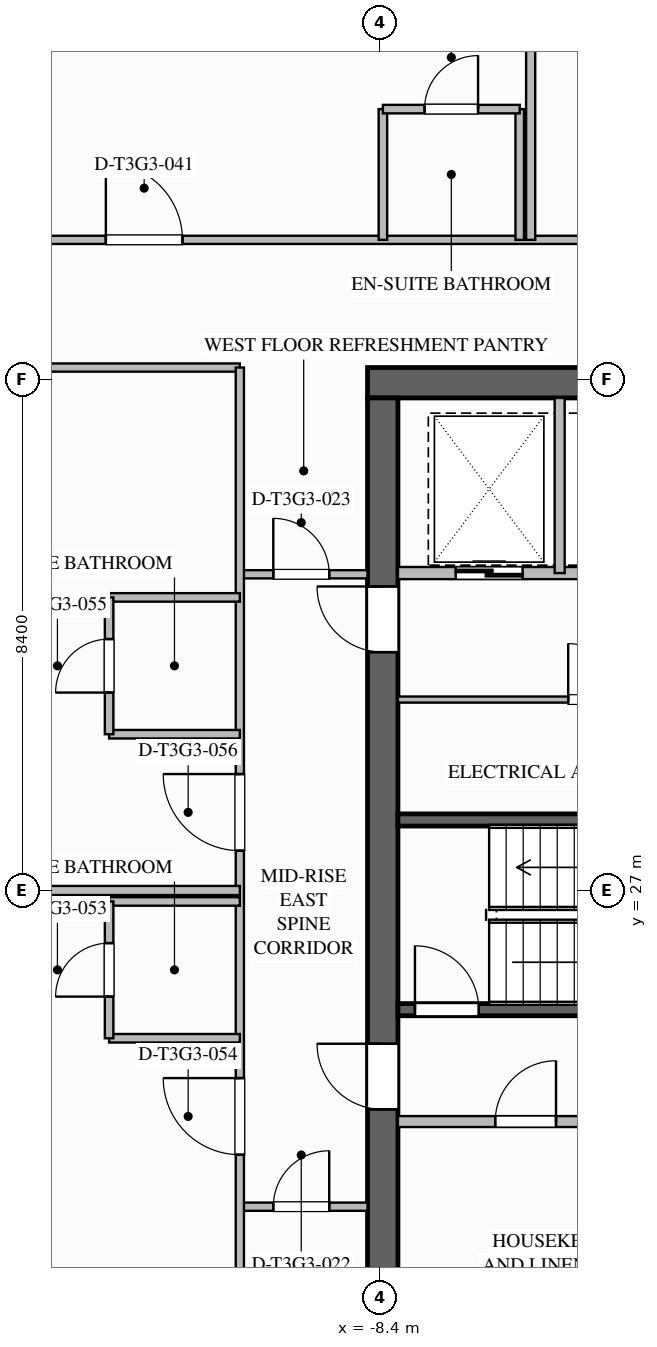
"""IFC4 building model, lengths in metres.
Left out: names, types, materials, properties, quantities, classifications, styles, units other than length and angle.
Written with IfcOpenShell. Run it as: python <this file> out.ifc"""

import sys

from ifc_helpers import new_model, si_unit, direction, frame, frame_2d, origin, place, context, subcontext, project, spatial, rectangle, extrude, element, fill, save


model = new_model("IFC4")
c1 = context("Model", 3, precision=1e-05, world=origin(), true_north=direction((0.0, 1.0)))
c2 = subcontext(c1, "Body", "Model", "MODEL_VIEW")
j1 = project(units=[si_unit("LENGTHUNIT", "METRE"), si_unit("PLANEANGLEUNIT", "RADIAN")], contexts=[c1])
p1 = place(None, origin())
s1 = spatial("IfcSite", under=j1, at=p1, CompositionType="ELEMENT")
p2 = place(p1, origin())
s2 = spatial("IfcBuilding", under=s1, at=p2, CompositionType="ELEMENT")
p3 = place(p2, frame((0.0, 0.0, 178.8)))
s3 = spatial("IfcBuildingStorey", under=s2, at=p3, CompositionType="ELEMENT", Elevation=178.8)
p4 = place(p3, frame((-8.6, 35.35, 0.0), z_axis=(0.0, 0.0, 1.0), x_axis=(1.0, 0.0, 0.0)))
e1 = element("IfcWall", 1, at=p4, inside=s3, PredefinedType="SHEAR", context=c2, shape_type="SweptSolid", body=[
    extrude(rectangle(XDim=17.2, YDim=0.5, at=frame_2d((8.6, 0.0))), origin(), (0.0, 0.0, 1.0), 3.55),
])
p5 = place(p3, frame((-8.35, 18.9, 0.0), z_axis=(0.0, 0.0, 1.0), x_axis=(0.0, 1.0, 0.0)))
e2 = element("IfcWall", 2, at=p5, inside=s3, PredefinedType="SHEAR", context=c2, shape_type="SweptSolid", body=[
    extrude(rectangle(XDim=16.2, YDim=0.5, at=frame_2d((8.1, 0.0))), origin(), (0.0, 0.0, 1.0), 3.55),
])
p6 = place(p5, frame((12.02, 0.0, 0.0)))
e3 = element("IfcOpeningElement", 3, at=p6, cuts=e2, PredefinedType="OPENING", context=c2, shape_type="SweptSolid", body=[
    extrude(rectangle(XDim=1.08, YDim=2.04, at=frame_2d((0.54, 1.02))), frame((0.0, 0.26, 0.0), z_axis=(0.0, -1.0, 0.0), x_axis=(1.0, 0.0, 0.0)), (0.0, 0.0, 1.0), 0.52),
])
p7 = place(p5, frame((4.5, 0.0, 0.0)))
e4 = element("IfcOpeningElement", 4, at=p7, cuts=e2, PredefinedType="OPENING", context=c2, shape_type="SweptSolid", body=[
    extrude(rectangle(XDim=1.08, YDim=2.04, at=frame_2d((0.54, 1.02))), frame((0.0, 0.26, 0.0), z_axis=(0.0, -1.0, 0.0), x_axis=(1.0, 0.0, 0.0)), (0.0, 0.0, 1.0), 0.52),
])
p8 = place(p3, frame((-8.1, 25.04, 0.0), z_axis=(0.0, 0.0, 1.0), x_axis=(1.0, 0.0, 0.0)))
e5 = element("IfcWall", 5, at=p8, inside=s3, PredefinedType="SOLIDWALL", context=c2, shape_type="SweptSolid", body=[
    extrude(rectangle(XDim=8.1, YDim=0.2, at=frame_2d((4.05, 0.0))), origin(), (0.0, 0.0, 1.0), 3.29),
])
p9 = place(p8, frame((0.28, 0.0, 0.0)))
e6 = element("IfcOpeningElement", 6, at=p9, cuts=e5, PredefinedType="OPENING", context=c2, shape_type="SweptSolid", body=[
    extrude(rectangle(XDim=1.05, YDim=2.1, at=frame_2d((0.525, 1.05))), frame((0.0, 0.11, 0.0), z_axis=(0.0, -1.0, 0.0), x_axis=(1.0, 0.0, 0.0)), (0.0, 0.0, 1.0), 0.22),
])
p10 = place(p3, frame((-8.1, 28.16, 0.0), z_axis=(0.0, 0.0, 1.0), x_axis=(1.0, 0.0, 0.0)))
e7 = element("IfcWall", 7, at=p10, inside=s3, PredefinedType="SOLIDWALL", context=c2, shape_type="SweptSolid", body=[
    extrude(rectangle(XDim=8.1, YDim=0.2, at=frame_2d((4.05, 0.0))), origin(), (0.0, 0.0, 1.0), 3.29),
])
p11 = place(p3, frame((-8.1, 32.22, 0.0), z_axis=(0.0, 0.0, 1.0), x_axis=(1.0, 0.0, 0.0)))
e8 = element("IfcWall", 8, at=p11, inside=s3, PredefinedType="SOLIDWALL", context=c2, shape_type="SweptSolid", body=[
    extrude(rectangle(XDim=7.1, YDim=0.2, at=frame_2d((3.55, 0.0))), origin(), (0.0, 0.0, 1.0), 3.29),
])
p12 = place(p11, frame((0.95, 0.0, 0.0)))
e9 = element("IfcOpeningElement", 9, at=p12, cuts=e8, PredefinedType="OPENING", context=c2, shape_type="SweptSolid", body=[
    extrude(rectangle(XDim=1.1, YDim=2.2, at=frame_2d((0.55, 1.1))), frame((0.0, 0.11, 0.0), z_axis=(0.0, -1.0, 0.0), x_axis=(1.0, 0.0, 0.0)), (0.0, 0.0, 1.0), 0.22),
])
p13 = place(p11, frame((3.27, 0.0, 0.0)))
e10 = element("IfcOpeningElement", 10, at=p13, cuts=e8, PredefinedType="OPENING", context=c2, shape_type="SweptSolid", body=[
    extrude(rectangle(XDim=1.1, YDim=2.2, at=frame_2d((0.55, 1.1))), frame((0.0, 0.11, 0.0), z_axis=(0.0, -1.0, 0.0), x_axis=(1.0, 0.0, 0.0)), (0.0, 0.0, 1.0), 0.22),
])
p14 = place(p11, frame((5.59, 0.0, 0.0)))
e11 = element("IfcOpeningElement", 11, at=p14, cuts=e8, PredefinedType="OPENING", context=c2, shape_type="SweptSolid", body=[
    extrude(rectangle(XDim=1.1, YDim=2.2, at=frame_2d((0.55, 1.1))), frame((0.0, 0.11, 0.0), z_axis=(0.0, -1.0, 0.0), x_axis=(1.0, 0.0, 0.0)), (0.0, 0.0, 1.0), 0.22),
])
p15 = place(p3, frame((-5.44, 32.22, 0.0), z_axis=(0.0, 0.0, 1.0), x_axis=(0.0, 1.0, 0.0)))
e12 = element("IfcWall", 12, at=p15, inside=s3, PredefinedType="PARTITIONING", context=c2, shape_type="SweptSolid", body=[
    extrude(rectangle(XDim=2.88, YDim=0.165, at=frame_2d((1.44, 0.0))), origin(), (0.0, 0.0, 1.0), 3.29),
])
p16 = place(p3, frame((-8.1, 30.14, 0.0), z_axis=(0.0, 0.0, 1.0), x_axis=(1.0, 0.0, 0.0)))
e13 = element("IfcWall", 13, at=p16, inside=s3, PredefinedType="PARTITIONING", context=c2, shape_type="SweptSolid", body=[
    extrude(rectangle(XDim=7.1, YDim=0.1, at=frame_2d((3.55, 0.0))), origin(), (0.0, 0.0, 1.0), 3.29),
])
p17 = place(p16, frame((2.8, 0.0, 0.0)))
e14 = element("IfcOpeningElement", 14, at=p17, cuts=e13, PredefinedType="OPENING", context=c2, shape_type="SweptSolid", body=[
    extrude(rectangle(XDim=0.92, YDim=2.1, at=frame_2d((0.46, 1.05))), frame((0.0, 0.06, 0.0), z_axis=(0.0, -1.0, 0.0), x_axis=(1.0, 0.0, 0.0)), (0.0, 0.0, 1.0), 0.12),
])
p18 = place(p3, frame((-8.1, 23.2, 0.0), z_axis=(0.0, 0.0, 1.0), x_axis=(1.0, 0.0, 0.0)))
e15 = element("IfcWall", 15, at=p18, inside=s3, PredefinedType="SOLIDWALL", context=c2, shape_type="SweptSolid", body=[
    extrude(rectangle(XDim=8.65, YDim=0.18, at=frame_2d((4.325, 0.0))), origin(), (0.0, 0.0, 1.0), 3.29),
])
p19 = place(p18, frame((1.6, 0.0, 0.0)))
e16 = element("IfcOpeningElement", 16, at=p19, cuts=e15, PredefinedType="OPENING", context=c2, shape_type="SweptSolid", body=[
    extrude(rectangle(XDim=1.0, YDim=2.1, at=frame_2d((0.5, 1.05))), frame((0.0, 0.1, 0.0), z_axis=(0.0, -1.0, 0.0), x_axis=(1.0, 0.0, 0.0)), (0.0, 0.0, 1.0), 0.2),
])
p20 = place(p18, frame((6.2, 0.0, 0.0)))
e17 = element("IfcOpeningElement", 17, at=p20, cuts=e15, PredefinedType="OPENING", context=c2, shape_type="SweptSolid", body=[
    extrude(rectangle(XDim=1.0, YDim=2.1, at=frame_2d((0.5, 1.05))), frame((0.0, 0.1, 0.0), z_axis=(0.0, -1.0, 0.0), x_axis=(1.0, 0.0, 0.0)), (0.0, 0.0, 1.0), 0.2),
])
p21 = place(p3, frame((-10.7, 21.8, 0.0), z_axis=(0.0, 0.0, 1.0), x_axis=(1.0, 0.0, 0.0)))
e18 = element("IfcWall", 18, at=p21, inside=s3, PredefinedType="PARTITIONING", context=c2, shape_type="SweptSolid", body=[
    extrude(rectangle(XDim=2.1, YDim=0.135, at=frame_2d((1.05, 0.0))), origin(), (0.0, 0.0, 1.0), 3.29),
])
p22 = place(p21, frame((0.55, 0.0, 0.0)))
e19 = element("IfcOpeningElement", 19, at=p22, cuts=e18, PredefinedType="OPENING", context=c2, shape_type="SweptSolid", body=[
    extrude(rectangle(XDim=0.92, YDim=2.1, at=frame_2d((0.46, 1.05))), frame((0.0, 0.077, 0.0), z_axis=(0.0, -1.0, 0.0), x_axis=(1.0, 0.0, 0.0)), (0.0, 0.0, 1.0), 0.155),
])
p23 = place(p3, frame((-10.7, 32.2, 0.0), z_axis=(0.0, 0.0, 1.0), x_axis=(1.0, 0.0, 0.0)))
e20 = element("IfcWall", 20, at=p23, inside=s3, PredefinedType="PARTITIONING", context=c2, shape_type="SweptSolid", body=[
    extrude(rectangle(XDim=2.1, YDim=0.135, at=frame_2d((1.05, 0.0))), origin(), (0.0, 0.0, 1.0), 3.29),
])
p24 = place(p23, frame((0.55, 0.0, 0.0)))
e21 = element("IfcOpeningElement", 21, at=p24, cuts=e20, PredefinedType="OPENING", context=c2, shape_type="SweptSolid", body=[
    extrude(rectangle(XDim=0.92, YDim=2.1, at=frame_2d((0.46, 1.05))), frame((0.0, 0.077, 0.0), z_axis=(0.0, -1.0, 0.0), x_axis=(1.0, 0.0, 0.0)), (0.0, 0.0, 1.0), 0.155),
])
p25 = place(p3, frame((-16.2, 35.6, 0.0), z_axis=(0.0, 0.0, 1.0), x_axis=(1.0, 0.0, 0.0)))
e22 = element("IfcWall", 22, at=p25, inside=s3, PredefinedType="PARTITIONING", context=c2, shape_type="SweptSolid", body=[
    extrude(rectangle(XDim=5.5, YDim=0.135, at=frame_2d((2.75, 0.0))), origin(), (0.0, 0.0, 1.0), 2.667),
])
p26 = place(p3, frame((-16.2, 37.7, 0.0), z_axis=(0.0, 0.0, 1.0), x_axis=(1.0, 0.0, 0.0)))
e23 = element("IfcWall", 23, at=p26, inside=s3, PredefinedType="PARTITIONING", context=c2, shape_type="SweptSolid", body=[
    extrude(rectangle(XDim=24.8, YDim=0.135, at=frame_2d((12.4, 0.0))), origin(), (0.0, 0.0, 1.0), 3.29),
])
p27 = place(p26, frame((3.296, 0.0, 0.0)))
e24 = element("IfcOpeningElement", 24, at=p27, cuts=e23, PredefinedType="OPENING", context=c2, shape_type="SweptSolid", body=[
    extrude(rectangle(XDim=1.26, YDim=2.2, at=frame_2d((0.63, 1.1))), frame((0.0, 0.077, 0.0), z_axis=(0.0, -1.0, 0.0), x_axis=(1.0, 0.0, 0.0)), (0.0, 0.0, 1.0), 0.155),
])
p28 = place(p26, frame((13.1, 0.0, 0.0)))
e25 = element("IfcOpeningElement", 25, at=p28, cuts=e23, PredefinedType="OPENING", context=c2, shape_type="SweptSolid", body=[
    extrude(rectangle(XDim=1.02, YDim=2.15, at=frame_2d((0.51, 1.075))), frame((0.0, 0.077, 0.0), z_axis=(0.0, -1.0, 0.0), x_axis=(1.0, 0.0, 0.0)), (0.0, 0.0, 1.0), 0.155),
])
p29 = place(p26, frame((19.023, 0.0, 0.0)))
e26 = element("IfcOpeningElement", 26, at=p29, cuts=e23, PredefinedType="OPENING", context=c2, shape_type="SweptSolid", body=[
    extrude(rectangle(XDim=1.26, YDim=2.2, at=frame_2d((0.63, 1.1))), frame((0.0, 0.077, 0.0), z_axis=(0.0, -1.0, 0.0), x_axis=(1.0, 0.0, 0.0)), (0.0, 0.0, 1.0), 0.155),
])
p30 = place(p3, frame((-10.7, 18.4, 0.0), z_axis=(0.0, 0.0, 1.0), x_axis=(0.0, 1.0, 0.0)))
e27 = element("IfcWall", 27, at=p30, inside=s3, PredefinedType="PARTITIONING", context=c2, shape_type="SweptSolid", body=[
    extrude(rectangle(XDim=17.2, YDim=0.135, at=frame_2d((8.6, 0.0))), origin(), (0.0, 0.0, 1.0), 3.29),
])
p31 = place(p30, frame((4.255, 0.0, 0.0)))
e28 = element("IfcOpeningElement", 28, at=p31, cuts=e27, PredefinedType="OPENING", context=c2, shape_type="SweptSolid", body=[
    extrude(rectangle(XDim=1.26, YDim=2.2, at=frame_2d((0.63, 1.1))), frame((0.0, 0.077, 0.0), z_axis=(0.0, -1.0, 0.0), x_axis=(1.0, 0.0, 0.0)), (0.0, 0.0, 1.0), 0.155),
])
p32 = place(p30, frame((9.255, 0.0, 0.0)))
e29 = element("IfcOpeningElement", 29, at=p32, cuts=e27, PredefinedType="OPENING", context=c2, shape_type="SweptSolid", body=[
    extrude(rectangle(XDim=1.26, YDim=2.2, at=frame_2d((0.63, 1.1))), frame((0.0, 0.077, 0.0), z_axis=(0.0, -1.0, 0.0), x_axis=(1.0, 0.0, 0.0)), (0.0, 0.0, 1.0), 0.155),
])
p33 = place(p3, frame((-8.347, 37.7, 0.0), z_axis=(0.0, 0.0, 1.0), x_axis=(0.0, 1.0, 0.0)))
e30 = element("IfcWall", 30, at=p33, inside=s3, PredefinedType="PLUMBINGWALL", context=c2, shape_type="SweptSolid", body=[
    extrude(rectangle(XDim=2.15, YDim=0.14, at=frame_2d((1.075, 0.0))), origin(), (0.0, 0.0, 1.0), 2.667),
])
p34 = place(p3, frame((-6.097, 37.7, 0.0), z_axis=(0.0, 0.0, 1.0), x_axis=(0.0, 1.0, 0.0)))
e31 = element("IfcWall", 31, at=p34, inside=s3, PredefinedType="PLUMBINGWALL", context=c2, shape_type="SweptSolid", body=[
    extrude(rectangle(XDim=2.15, YDim=0.14, at=frame_2d((1.075, 0.0))), origin(), (0.0, 0.0, 1.0), 3.29),
])
p35 = place(p3, frame((-8.347, 39.85, 0.0), z_axis=(0.0, 0.0, 1.0), x_axis=(1.0, 0.0, 0.0)))
e32 = element("IfcWall", 32, at=p35, inside=s3, PredefinedType="PLUMBINGWALL", context=c2, shape_type="SweptSolid", body=[
    extrude(rectangle(XDim=2.25, YDim=0.14, at=frame_2d((1.125, 0.0))), origin(), (0.0, 0.0, 1.0), 3.29),
])
p36 = place(p35, frame((0.685, 0.0, 0.0)))
e33 = element("IfcOpeningElement", 33, at=p36, cuts=e32, PredefinedType="OPENING", context=c2, shape_type="SweptSolid", body=[
    extrude(rectangle(XDim=0.88, YDim=2.1, at=frame_2d((0.44, 1.05))), frame((0.0, 0.08, 0.0), z_axis=(0.0, -1.0, 0.0), x_axis=(1.0, 0.0, 0.0)), (0.0, 0.0, 1.0), 0.16),
])
p37 = place(p3, frame((-5.917, 37.7, 0.0), z_axis=(0.0, 0.0, 1.0), x_axis=(0.0, 1.0, 0.0)))
e34 = element("IfcWall", 34, at=p37, inside=s3, PredefinedType="PARTITIONING", context=c2, shape_type="SweptSolid", body=[
    extrude(rectangle(XDim=10.7, YDim=0.15, at=frame_2d((5.35, 0.0))), origin(), (0.0, 0.0, 1.0), 3.29),
])
p38 = place(p3, frame((-26.2, 27.0, 0.0), z_axis=(0.0, 0.0, 1.0), x_axis=(1.0, 0.0, 0.0)))
e35 = element("IfcWall", 35, at=p38, inside=s3, PredefinedType="PARTITIONING", context=c2, shape_type="SweptSolid", body=[
    extrude(rectangle(XDim=15.5, YDim=0.15, at=frame_2d((7.75, 0.0))), origin(), (0.0, 0.0, 1.0), 2.58),
])
p39 = place(p3, frame((-10.7, 24.57, 0.0), z_axis=(0.0, 0.0, 1.0), x_axis=(-1.0, 0.0, 0.0)))
e36 = element("IfcWall", 36, at=p39, inside=s3, PredefinedType="PLUMBINGWALL", context=c2, shape_type="SweptSolid", body=[
    extrude(rectangle(XDim=2.15, YDim=0.14, at=frame_2d((1.075, 0.0))), origin(), (0.0, 0.0, 1.0), 3.29),
])
p40 = place(p3, frame((-10.7, 26.82, 0.0), z_axis=(0.0, 0.0, 1.0), x_axis=(-1.0, 0.0, 0.0)))
e37 = element("IfcWall", 37, at=p40, inside=s3, PredefinedType="PLUMBINGWALL", context=c2, shape_type="SweptSolid", body=[
    extrude(rectangle(XDim=2.15, YDim=0.14, at=frame_2d((1.075, 0.0))), origin(), (0.0, 0.0, 1.0), 2.667),
])
p41 = place(p3, frame((-12.85, 24.57, 0.0), z_axis=(0.0, 0.0, 1.0), x_axis=(0.0, 1.0, 0.0)))
e38 = element("IfcWall", 38, at=p41, inside=s3, PredefinedType="PLUMBINGWALL", context=c2, shape_type="SweptSolid", body=[
    extrude(rectangle(XDim=2.25, YDim=0.14, at=frame_2d((1.125, 0.0))), origin(), (0.0, 0.0, 1.0), 3.29),
])
p42 = place(p41, frame((0.685, 0.0, 0.0)))
e39 = element("IfcOpeningElement", 39, at=p42, cuts=e38, PredefinedType="OPENING", context=c2, shape_type="SweptSolid", body=[
    extrude(rectangle(XDim=0.88, YDim=2.1, at=frame_2d((0.44, 1.05))), frame((0.0, 0.08, 0.0), z_axis=(0.0, -1.0, 0.0), x_axis=(1.0, 0.0, 0.0)), (0.0, 0.0, 1.0), 0.16),
])
for number, where, z_axis, x_axis in (
    (40, (-10.7, 29.57, 0.0), (0.0, 0.0, 1.0), (-1.0, 0.0, 0.0)),
    (41, (-10.7, 31.82, 0.0), (0.0, 0.0, 1.0), (-1.0, 0.0, 0.0)),
):
    element("IfcWall", number, at=place(p3, frame(where, z_axis=z_axis, x_axis=x_axis)), inside=s3, PredefinedType="PLUMBINGWALL", context=c2, shape_type="SweptSolid", body=[
        extrude(rectangle(XDim=2.15, YDim=0.14, at=frame_2d((1.075, 0.0))), origin(), (0.0, 0.0, 1.0), 3.29),
    ])
p43 = place(p3, frame((-12.85, 29.57, 0.0), z_axis=(0.0, 0.0, 1.0), x_axis=(0.0, 1.0, 0.0)))
e42 = element("IfcWall", 42, at=p43, inside=s3, PredefinedType="PLUMBINGWALL", context=c2, shape_type="SweptSolid", body=[
    extrude(rectangle(XDim=2.25, YDim=0.14, at=frame_2d((1.125, 0.0))), origin(), (0.0, 0.0, 1.0), 3.29),
])
p44 = place(p43, frame((0.685, 0.0, 0.0)))
e43 = element("IfcOpeningElement", 43, at=p44, cuts=e42, PredefinedType="OPENING", context=c2, shape_type="SweptSolid", body=[
    extrude(rectangle(XDim=0.88, YDim=2.1, at=frame_2d((0.44, 1.05))), frame((0.0, 0.08, 0.0), z_axis=(0.0, -1.0, 0.0), x_axis=(1.0, 0.0, 0.0)), (0.0, 0.0, 1.0), 0.16),
])
p45 = place(p9, origin())
e44 = element("IfcDoor", 44, at=p45, inside=s3, OperationType="SINGLE_SWING_LEFT", PredefinedType="DOOR", context=c2, shape_type="SweptSolid", body=[
    extrude(rectangle(XDim=1.05, YDim=2.1, at=frame_2d((0.525, 1.05))), frame((0.0, 0.025, 0.0), z_axis=(0.0, -1.0, 0.0), x_axis=(1.0, 0.0, 0.0)), (0.0, 0.0, 1.0), 0.05),
])
fill(e6, e44)
p46 = place(p12, origin())
e45 = element("IfcDoor", 45, at=p46, inside=s3, OperationType="SLIDING_TO_LEFT", PredefinedType="DOOR", context=c2, shape_type="SweptSolid", body=[
    extrude(rectangle(XDim=1.1, YDim=2.2, at=frame_2d((0.55, 1.1))), frame((0.0, 0.025, 0.0), z_axis=(0.0, -1.0, 0.0), x_axis=(1.0, 0.0, 0.0)), (0.0, 0.0, 1.0), 0.05),
])
fill(e9, e45)
p47 = place(p6, origin())
e46 = element("IfcDoor", 46, at=p47, inside=s3, OperationType="SINGLE_SWING_RIGHT", PredefinedType="DOOR", context=c2, shape_type="SweptSolid", body=[
    extrude(rectangle(XDim=1.08, YDim=2.04, at=frame_2d((0.54, 1.02))), frame((0.0, 0.025, 0.0), z_axis=(0.0, -1.0, 0.0), x_axis=(1.0, 0.0, 0.0)), (0.0, 0.0, 1.0), 0.05),
])
fill(e3, e46)
p48 = place(p17, origin())
e47 = element("IfcDoor", 47, at=p48, inside=s3, OperationType="SINGLE_SWING_LEFT", PredefinedType="DOOR", context=c2, shape_type="SweptSolid", body=[
    extrude(rectangle(XDim=0.92, YDim=2.1, at=frame_2d((0.46, 1.05))), frame((0.0, 0.025, 0.0), z_axis=(0.0, -1.0, 0.0), x_axis=(1.0, 0.0, 0.0)), (0.0, 0.0, 1.0), 0.05),
])
fill(e14, e47)
p49 = place(p7, origin())
e48 = element("IfcDoor", 48, at=p49, inside=s3, OperationType="SINGLE_SWING_RIGHT", PredefinedType="DOOR", context=c2, shape_type="SweptSolid", body=[
    extrude(rectangle(XDim=1.08, YDim=2.04, at=frame_2d((0.54, 1.02))), frame((0.0, 0.025, 0.0), z_axis=(0.0, -1.0, 0.0), x_axis=(1.0, 0.0, 0.0)), (0.0, 0.0, 1.0), 0.05),
])
fill(e4, e48)
p50 = place(p19, origin())
e49 = element("IfcDoor", 49, at=p50, inside=s3, OperationType="SINGLE_SWING_RIGHT", PredefinedType="DOOR", context=c2, shape_type="SweptSolid", body=[
    extrude(rectangle(XDim=1.0, YDim=2.1, at=frame_2d((0.5, 1.05))), frame((0.0, 0.025, 0.0), z_axis=(0.0, -1.0, 0.0), x_axis=(1.0, 0.0, 0.0)), (0.0, 0.0, 1.0), 0.05),
])
fill(e16, e49)
p51 = place(p22, origin())
e50 = element("IfcDoor", 50, at=p51, inside=s3, OperationType="SINGLE_SWING_RIGHT", PredefinedType="DOOR", context=c2, shape_type="SweptSolid", body=[
    extrude(rectangle(XDim=0.92, YDim=2.1, at=frame_2d((0.46, 1.05))), frame((0.0, 0.025, 0.0), z_axis=(0.0, -1.0, 0.0), x_axis=(1.0, 0.0, 0.0)), (0.0, 0.0, 1.0), 0.05),
])
fill(e19, e50)
p52 = place(p24, origin())
e51 = element("IfcDoor", 51, at=p52, inside=s3, OperationType="SINGLE_SWING_LEFT", PredefinedType="DOOR", context=c2, shape_type="SweptSolid", body=[
    extrude(rectangle(XDim=0.92, YDim=2.1, at=frame_2d((0.46, 1.05))), frame((0.0, 0.025, 0.0), z_axis=(0.0, -1.0, 0.0), x_axis=(1.0, 0.0, 0.0)), (0.0, 0.0, 1.0), 0.05),
])
fill(e21, e51)
p53 = place(p36, origin())
e52 = element("IfcDoor", 52, at=p53, inside=s3, OperationType="SINGLE_SWING_RIGHT", PredefinedType="DOOR", context=c2, shape_type="SweptSolid", body=[
    extrude(rectangle(XDim=0.88, YDim=2.1, at=frame_2d((0.44, 1.05))), frame((0.0, 0.025, 0.0), z_axis=(0.0, -1.0, 0.0), x_axis=(1.0, 0.0, 0.0)), (0.0, 0.0, 1.0), 0.05),
])
fill(e33, e52)
p54 = place(p27, origin())
e53 = element("IfcDoor", 53, at=p54, inside=s3, OperationType="SINGLE_SWING_LEFT", PredefinedType="DOOR", context=c2, shape_type="SweptSolid", body=[
    extrude(rectangle(XDim=1.26, YDim=2.2, at=frame_2d((0.63, 1.1))), frame((0.0, 0.025, 0.0), z_axis=(0.0, -1.0, 0.0), x_axis=(1.0, 0.0, 0.0)), (0.0, 0.0, 1.0), 0.05),
])
fill(e24, e53)
p55 = place(p42, origin())
e54 = element("IfcDoor", 54, at=p55, inside=s3, OperationType="SINGLE_SWING_LEFT", PredefinedType="DOOR", context=c2, shape_type="SweptSolid", body=[
    extrude(rectangle(XDim=0.88, YDim=2.1, at=frame_2d((0.44, 1.05))), frame((0.0, 0.025, 0.0), z_axis=(0.0, -1.0, 0.0), x_axis=(1.0, 0.0, 0.0)), (0.0, 0.0, 1.0), 0.05),
])
fill(e39, e54)
p56 = place(p31, origin())
e55 = element("IfcDoor", 55, at=p56, inside=s3, OperationType="SINGLE_SWING_RIGHT", PredefinedType="DOOR", context=c2, shape_type="SweptSolid", body=[
    extrude(rectangle(XDim=1.26, YDim=2.2, at=frame_2d((0.63, 1.1))), frame((0.0, 0.025, 0.0), z_axis=(0.0, -1.0, 0.0), x_axis=(1.0, 0.0, 0.0)), (0.0, 0.0, 1.0), 0.05),
])
fill(e28, e55)
p57 = place(p44, origin())
e56 = element("IfcDoor", 56, at=p57, inside=s3, OperationType="SINGLE_SWING_LEFT", PredefinedType="DOOR", context=c2, shape_type="SweptSolid", body=[
    extrude(rectangle(XDim=0.88, YDim=2.1, at=frame_2d((0.44, 1.05))), frame((0.0, 0.025, 0.0), z_axis=(0.0, -1.0, 0.0), x_axis=(1.0, 0.0, 0.0)), (0.0, 0.0, 1.0), 0.05),
])
fill(e43, e56)
p58 = place(p32, origin())
e57 = element("IfcDoor", 57, at=p58, inside=s3, OperationType="SINGLE_SWING_RIGHT", PredefinedType="DOOR", context=c2, shape_type="SweptSolid", body=[
    extrude(rectangle(XDim=1.26, YDim=2.2, at=frame_2d((0.63, 1.1))), frame((0.0, 0.025, 0.0), z_axis=(0.0, -1.0, 0.0), x_axis=(1.0, 0.0, 0.0)), (0.0, 0.0, 1.0), 0.05),
])
fill(e29, e57)
save(model, sys.argv[1])
